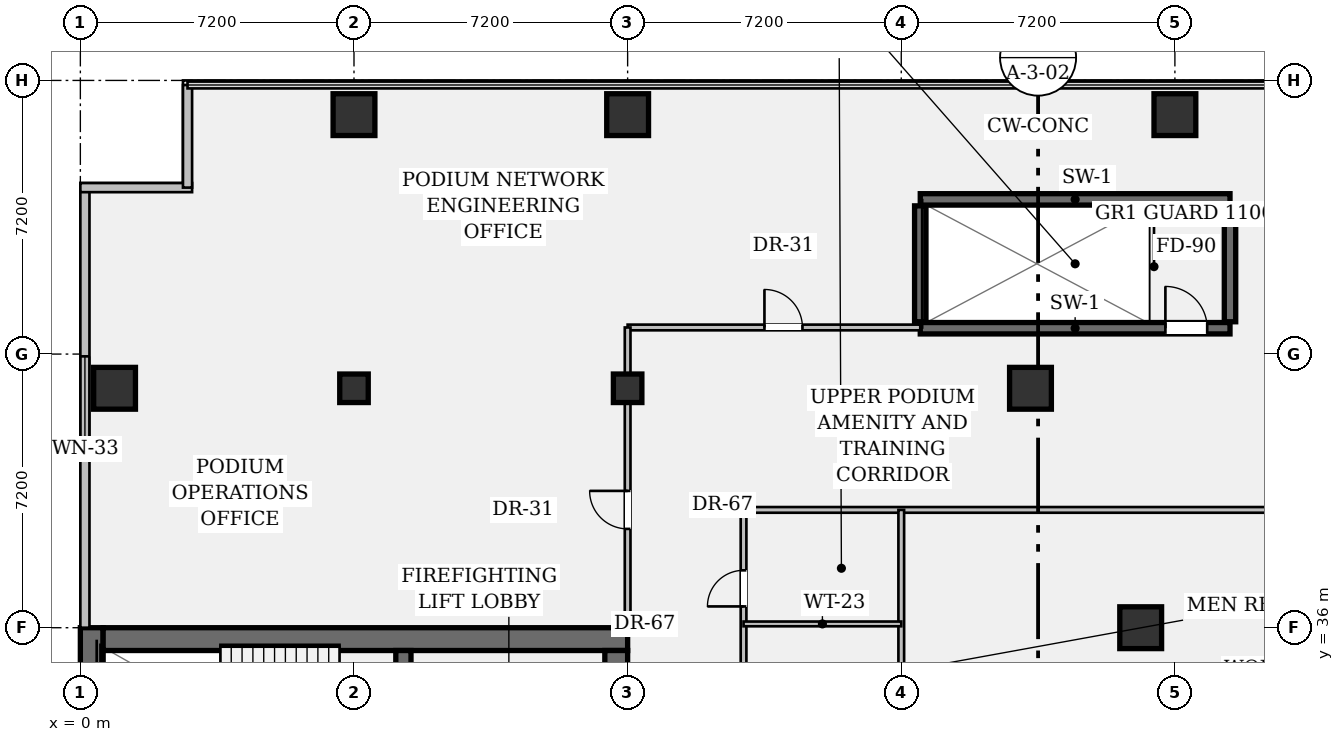
"""IFC4 building model, lengths in metres.
Left out: names, types, materials, properties, quantities, classifications, styles, units other than length and angle.
Written with IfcOpenShell. Run it as: python <this file> out.ifc"""

import sys

from ifc_helpers import new_model, si_unit, direction, frame, frame_2d, origin, origin_2d, place, context, subcontext, project, spatial, rectangle, hollow_rectangle, extrude, element, fill, save


model = new_model("IFC4")
c1 = context("Model", 3, precision=1e-05, world=origin(), true_north=direction((0.0, 1.0)))
c2 = subcontext(c1, "Body", "Model", "MODEL_VIEW")
j1 = project(units=[si_unit("LENGTHUNIT", "METRE"), si_unit("PLANEANGLEUNIT", "RADIAN")], contexts=[c1])
p1 = place(None, origin())
s1 = spatial("IfcSite", under=j1, at=p1, CompositionType="ELEMENT")
p2 = place(p1, origin())
s2 = spatial("IfcBuilding", under=s1, at=p2, CompositionType="ELEMENT")
p3 = place(p2, frame((0.0, 0.0, 22.05)))
s3 = spatial("IfcBuildingStorey", under=s2, at=p3, CompositionType="ELEMENT", Elevation=22.05)
p4 = place(p3, frame((0.3, 7.2, 0.0), z_axis=(0.0, 0.0, 1.0), x_axis=(0.0, 1.0, 0.0)))
e1 = element("IfcWall", 1, at=p4, inside=s3, PredefinedType="SHEAR", context=c2, shape_type="SweptSolid", body=[
    extrude(rectangle(XDim=28.8, YDim=0.6, at=frame_2d((14.4, 0.0))), origin(), (0.0, 0.0, 1.0), 3.9),
])
p5 = place(p3, frame((0.6, 35.7, 0.0), z_axis=(0.0, 0.0, 1.0), x_axis=(1.0, 0.0, 0.0)))
e2 = element("IfcWall", 2, at=p5, inside=s3, PredefinedType="SHEAR", context=c2, shape_type="SweptSolid", body=[
    extrude(rectangle(XDim=13.8, YDim=0.6, at=frame_2d((6.9, 0.0))), origin(), (0.0, 0.0, 1.0), 3.9),
])
p6 = place(p3, frame((14.1, 35.4, 0.0), z_axis=(0.0, 0.0, 1.0), x_axis=(0.0, -1.0, 0.0)))
e3 = element("IfcWall", 3, at=p6, inside=s3, PredefinedType="SHEAR", context=c2, shape_type="SweptSolid", body=[
    extrude(rectangle(XDim=27.6, YDim=0.6, at=frame_2d((13.8, 0.0))), origin(), (0.0, 0.0, 1.0), 3.9),
])
p7 = place(p6, frame((1.3, 0.0, 0.0)))
e4 = element("IfcOpeningElement", 4, at=p7, cuts=e3, PredefinedType="OPENING", context=c2, shape_type="SweptSolid", body=[
    extrude(rectangle(XDim=1.2, YDim=2.15, at=frame_2d((0.6, 1.075))), frame((0.0, 0.312, 0.0), z_axis=(0.0, -1.0, 0.0), x_axis=(1.0, 0.0, 0.0)), (0.0, 0.0, 1.0), 0.624),
])
p8 = place(p6, frame((25.25, 0.0, 0.0)))
e5 = element("IfcOpeningElement", 5, at=p8, cuts=e3, PredefinedType="OPENING", context=c2, shape_type="SweptSolid", body=[
    extrude(rectangle(XDim=1.2, YDim=2.15, at=frame_2d((0.6, 1.075))), frame((0.0, 0.312, 0.0), z_axis=(0.0, -1.0, 0.0), x_axis=(1.0, 0.0, 0.0)), (0.0, 0.0, 1.0), 0.624),
])
p9 = place(p6, frame((14.6, 0.0, 0.0)))
e6 = element("IfcOpeningElement", 6, at=p9, cuts=e3, PredefinedType="OPENING", context=c2, shape_type="SweptSolid", body=[
    extrude(rectangle(XDim=1.6, YDim=2.2, at=frame_2d((0.8, 1.1))), frame((0.0, 0.312, 0.0), z_axis=(0.0, -1.0, 0.0), x_axis=(1.0, 0.0, 0.0)), (0.0, 0.0, 1.0), 0.624),
])
p10 = place(p3, frame((8.5, 31.72, 0.0), z_axis=(0.0, 0.0, 1.0), x_axis=(0.0, 1.0, 0.0)))
e7 = element("IfcWall", 7, at=p10, inside=s3, PredefinedType="SHEAR", context=c2, shape_type="SweptSolid", body=[
    extrude(rectangle(XDim=3.68, YDim=0.4, at=frame_2d((1.84, 0.0))), origin(), (0.0, 0.0, 1.0), 3.9),
])
p11 = place(p10, frame((0.9, 0.0, 0.0)))
e8 = element("IfcOpeningElement", 8, at=p11, cuts=e7, PredefinedType="OPENING", context=c2, shape_type="SweptSolid", body=[
    extrude(rectangle(XDim=1.1, YDim=2.15, at=frame_2d((0.55, 1.075))), frame((0.0, 0.212, 0.0), z_axis=(0.0, -1.0, 0.0), x_axis=(1.0, 0.0, 0.0)), (0.0, 0.0, 1.0), 0.424),
])
p12 = place(p3, frame((22.1, 43.88, 0.0), z_axis=(0.0, 0.0, 1.0), x_axis=(1.0, 0.0, 0.0)))
e9 = element("IfcWall", 9, at=p12, inside=s3, PredefinedType="SHEAR", context=c2, shape_type="SweptSolid", body=[
    extrude(rectangle(XDim=8.15, YDim=0.3, at=frame_2d((4.075, 0.0))), origin(), (0.0, 0.0, 1.0), 3.9),
])
p13 = place(p12, frame((6.45, 0.0, 0.0)))
e10 = element("IfcOpeningElement", 10, at=p13, cuts=e9, PredefinedType="OPENING", context=c2, shape_type="SweptSolid", body=[
    extrude(rectangle(XDim=1.1, YDim=2.15, at=frame_2d((0.55, 1.075))), frame((0.0, 0.162, 0.0), z_axis=(0.0, -1.0, 0.0), x_axis=(1.0, 0.0, 0.0)), (0.0, 0.0, 1.0), 0.324),
])
p14 = place(p3, frame((22.1, 47.27, 0.0), z_axis=(0.0, 0.0, 1.0), x_axis=(1.0, 0.0, 0.0)))
e11 = element("IfcWall", 11, at=p14, inside=s3, PredefinedType="SHEAR", context=c2, shape_type="SweptSolid", body=[
    extrude(rectangle(XDim=8.15, YDim=0.3, at=frame_2d((4.075, 0.0))), origin(), (0.0, 0.0, 1.0), 3.9),
])
for number, where, z_axis, x_axis in (
    (12, (22.1, 44.05, 0.0), (0.0, 0.0, 1.0), (0.0, 1.0, 0.0)),
    (13, (30.25, 44.05, 0.0), (0.0, 0.0, 1.0), (0.0, 1.0, 0.0)),
):
    element("IfcWall", number, at=place(p3, frame(where, z_axis=z_axis, x_axis=x_axis)), inside=s3, PredefinedType="SHEAR", context=c2, shape_type="SweptSolid", body=[
        extrude(rectangle(XDim=3.05, YDim=0.3, at=frame_2d((1.525, 0.0))), origin(), (0.0, 0.0, 1.0), 3.9),
    ])
p15 = place(p3, frame((0.9, 42.3, 0.0), z_axis=(0.0, 0.0, 1.0), x_axis=(1.0, 0.0, 0.0)))
e14 = element("IfcColumn", 14, at=p15, inside=s3, PredefinedType="COLUMN", context=c2, shape_type="SweptSolid", body=[
    extrude(hollow_rectangle(XDim=1.1, YDim=1.1, WallThickness=0.07, at=origin_2d()), origin(), (0.0, 0.0, 1.0), 3.9),
])
p16 = place(p3, frame((7.2, 42.3, 0.0), z_axis=(0.0, 0.0, 1.0), x_axis=(1.0, 0.0, 0.0)))
e15 = element("IfcColumn", 15, at=p16, inside=s3, PredefinedType="COLUMN", context=c2, shape_type="SweptSolid", body=[
    extrude(rectangle(XDim=0.75, YDim=0.75, at=origin_2d()), origin(), (0.0, 0.0, 1.0), 3.9),
])
p17 = place(p3, frame((7.2, 49.5, 0.0), z_axis=(0.0, 0.0, 1.0), x_axis=(1.0, 0.0, 0.0)))
e16 = element("IfcColumn", 16, at=p17, inside=s3, PredefinedType="COLUMN", context=c2, shape_type="SweptSolid", body=[
    extrude(hollow_rectangle(XDim=1.1, YDim=1.1, WallThickness=0.07, at=origin_2d()), origin(), (0.0, 0.0, 1.0), 3.9),
])
p18 = place(p3, frame((14.4, 42.3, 0.0), z_axis=(0.0, 0.0, 1.0), x_axis=(1.0, 0.0, 0.0)))
e17 = element("IfcColumn", 17, at=p18, inside=s3, PredefinedType="COLUMN", context=c2, shape_type="SweptSolid", body=[
    extrude(rectangle(XDim=0.75, YDim=0.75, at=origin_2d()), origin(), (0.0, 0.0, 1.0), 3.9),
])
for number, where, z_axis, x_axis in (
    (18, (14.4, 49.5, 0.0), (0.0, 0.0, 1.0), (1.0, 0.0, 0.0)),
    (19, (25.0, 42.3, 0.0), (0.0, 0.0, 1.0), (1.0, 0.0, 0.0)),
    (20, (27.9, 36.0, 0.0), (0.0, 0.0, 1.0), (1.0, 0.0, 0.0)),
    (21, (28.8, 49.5, 0.0), (0.0, 0.0, 1.0), (1.0, 0.0, 0.0)),
):
    element("IfcColumn", number, at=place(p3, frame(where, z_axis=z_axis, x_axis=x_axis)), inside=s3, PredefinedType="COLUMN", context=c2, shape_type="SweptSolid", body=[
        extrude(hollow_rectangle(XDim=1.1, YDim=1.1, WallThickness=0.07, at=origin_2d()), origin(), (0.0, 0.0, 1.0), 3.9),
    ])
p19 = place(p3, frame((0.12, 36.0, 0.0), z_axis=(0.0, 0.0, 1.0), x_axis=(0.0, 1.0, 0.0)))
e22 = element("IfcWall", 22, at=p19, inside=s3, PredefinedType="STANDARD", context=c2, shape_type="SweptSolid", body=[
    extrude(rectangle(XDim=11.58, YDim=0.24, at=frame_2d((5.79, 0.0))), origin(), (0.0, 0.0, 1.0), 3.9),
])
p20 = place(p19, frame((4.44, 0.0, 0.95)))
e23 = element("IfcOpeningElement", 23, at=p20, cuts=e22, PredefinedType="OPENING", context=c2, shape_type="SweptSolid", body=[
    extrude(rectangle(XDim=2.7, YDim=1.65, at=frame_2d((1.35, 0.825))), frame((0.0, 0.132, 0.0), z_axis=(0.0, -1.0, 0.0), x_axis=(1.0, 0.0, 0.0)), (0.0, 0.0, 1.0), 0.264),
])
p21 = place(p3, frame((0.0, 47.58, 0.0), z_axis=(0.0, 0.0, 1.0), x_axis=(1.0, 0.0, 0.0)))
e24 = element("IfcWall", 24, at=p21, inside=s3, PredefinedType="STANDARD", context=c2, shape_type="SweptSolid", body=[
    extrude(rectangle(XDim=2.94, YDim=0.24, at=frame_2d((1.47, 0.0))), origin(), (0.0, 0.0, 1.0), 3.9),
])
p22 = place(p3, frame((2.82, 47.58, 0.0), z_axis=(0.0, 0.0, 1.0), x_axis=(0.0, 1.0, 0.0)))
e25 = element("IfcWall", 25, at=p22, inside=s3, PredefinedType="STANDARD", context=c2, shape_type="SweptSolid", body=[
    extrude(rectangle(XDim=2.7, YDim=0.24, at=frame_2d((1.35, 0.0))), origin(), (0.0, 0.0, 1.0), 3.9),
])
p23 = place(p3, frame((17.45, 26.8, 0.0), z_axis=(0.0, 0.0, 1.0), x_axis=(0.0, 1.0, 0.0)))
e26 = element("IfcWall", 26, at=p23, inside=s3, PredefinedType="PARTITIONING", context=c2, shape_type="SweptSolid", body=[
    extrude(rectangle(XDim=12.3, YDim=0.15, at=frame_2d((6.15, 0.0))), origin(), (0.0, 0.0, 1.0), 2.958),
])
p24 = place(p23, frame((9.76, 0.0, 0.0)))
e27 = element("IfcOpeningElement", 27, at=p24, cuts=e26, PredefinedType="OPENING", context=c2, shape_type="SweptSolid", body=[
    extrude(rectangle(XDim=0.95, YDim=2.15, at=frame_2d((0.475, 1.075))), frame((0.0, 0.087, 0.0), z_axis=(0.0, -1.0, 0.0), x_axis=(1.0, 0.0, 0.0)), (0.0, 0.0, 1.0), 0.174),
])
p25 = place(p23, frame((6.76, 0.0, 0.0)))
e28 = element("IfcOpeningElement", 28, at=p25, cuts=e26, PredefinedType="OPENING", context=c2, shape_type="SweptSolid", body=[
    extrude(rectangle(XDim=0.95, YDim=2.15, at=frame_2d((0.475, 1.075))), frame((0.0, 0.087, 0.0), z_axis=(0.0, -1.0, 0.0), x_axis=(1.0, 0.0, 0.0)), (0.0, 0.0, 1.0), 0.174),
])
p26 = place(p23, frame((3.76, 0.0, 0.0)))
e29 = element("IfcOpeningElement", 29, at=p26, cuts=e26, PredefinedType="OPENING", context=c2, shape_type="SweptSolid", body=[
    extrude(rectangle(XDim=0.95, YDim=2.15, at=frame_2d((0.475, 1.075))), frame((0.0, 0.087, 0.0), z_axis=(0.0, -1.0, 0.0), x_axis=(1.0, 0.0, 0.0)), (0.0, 0.0, 1.0), 0.174),
])
p27 = place(p23, frame((0.65, 0.0, 0.0)))
e30 = element("IfcOpeningElement", 30, at=p27, cuts=e26, PredefinedType="OPENING", context=c2, shape_type="SweptSolid", body=[
    extrude(rectangle(XDim=0.95, YDim=2.15, at=frame_2d((0.475, 1.075))), frame((0.0, 0.087, 0.0), z_axis=(0.0, -1.0, 0.0), x_axis=(1.0, 0.0, 0.0)), (0.0, 0.0, 1.0), 0.174),
])
p28 = place(p3, frame((14.4, 43.9, 0.0), z_axis=(0.0, 0.0, 1.0), x_axis=(1.0, 0.0, 0.0)))
e31 = element("IfcWall", 31, at=p28, inside=s3, PredefinedType="PARTITIONING", context=c2, shape_type="SweptSolid", body=[
    extrude(rectangle(XDim=7.7, YDim=0.15, at=frame_2d((3.85, 0.0))), origin(), (0.0, 0.0, 1.0), 2.958),
])
p29 = place(p28, frame((3.6, 0.0, 0.0)))
e32 = element("IfcOpeningElement", 32, at=p29, cuts=e31, PredefinedType="OPENING", context=c2, shape_type="SweptSolid", body=[
    extrude(rectangle(XDim=1.0, YDim=2.15, at=frame_2d((0.5, 1.075))), frame((0.0, 0.087, 0.0), z_axis=(0.0, -1.0, 0.0), x_axis=(1.0, 0.0, 0.0)), (0.0, 0.0, 1.0), 0.174),
])
p30 = place(p3, frame((17.45, 39.1, 0.0), z_axis=(0.0, 0.0, 1.0), x_axis=(1.0, 0.0, 0.0)))
e33 = element("IfcWall", 33, at=p30, inside=s3, PredefinedType="PARTITIONING", context=c2, shape_type="SweptSolid", body=[
    extrude(rectangle(XDim=32.83, YDim=0.15, at=frame_2d((16.415, 0.0))), origin(), (0.0, 0.0, 1.0), 2.958),
])
p31 = place(p3, frame((21.6, 26.8, 0.0), z_axis=(0.0, 0.0, 1.0), x_axis=(0.0, 1.0, 0.0)))
e34 = element("IfcWall", 34, at=p31, inside=s3, PredefinedType="PARTITIONING", context=c2, shape_type="SweptSolid", body=[
    extrude(rectangle(XDim=12.3, YDim=0.15, at=frame_2d((6.15, 0.0))), origin(), (0.0, 0.0, 1.0), 2.958),
])
p32 = place(p3, frame((17.45, 36.1, 0.0), z_axis=(0.0, 0.0, 1.0), x_axis=(1.0, 0.0, 0.0)))
e35 = element("IfcWall", 35, at=p32, inside=s3, PredefinedType="PARTITIONING", context=c2, shape_type="SweptSolid", body=[
    extrude(rectangle(XDim=4.15, YDim=0.125, at=frame_2d((2.075, 0.0))), origin(), (0.0, 0.0, 1.0), 2.958),
])
p33 = place(p3, frame((14.4, 36.0, 0.0), z_axis=(0.0, 0.0, 1.0), x_axis=(0.0, 1.0, 0.0)))
e36 = element("IfcWall", 36, at=p33, inside=s3, PredefinedType="PARTITIONING", context=c2, shape_type="SweptSolid", body=[
    extrude(rectangle(XDim=7.9, YDim=0.15, at=frame_2d((3.95, 0.0))), origin(), (0.0, 0.0, 1.0), 2.958),
])
p34 = place(p33, frame((2.6, 0.0, 0.0)))
e37 = element("IfcOpeningElement", 37, at=p34, cuts=e36, PredefinedType="OPENING", context=c2, shape_type="SweptSolid", body=[
    extrude(rectangle(XDim=1.0, YDim=2.15, at=frame_2d((0.5, 1.075))), frame((0.0, 0.087, 0.0), z_axis=(0.0, -1.0, 0.0), x_axis=(1.0, 0.0, 0.0)), (0.0, 0.0, 1.0), 0.174),
])
p35 = place(p20, origin())
e38 = element("IfcWindow", 38, at=p35, inside=s3, PartitioningType="SINGLE_PANEL", PredefinedType="WINDOW", context=c2, shape_type="SweptSolid", body=[
    extrude(rectangle(XDim=2.7, YDim=1.65, at=frame_2d((1.35, 0.825))), frame((0.0, 0.03, 0.0), z_axis=(0.0, -1.0, 0.0), x_axis=(1.0, 0.0, 0.0)), (0.0, 0.0, 1.0), 0.06),
])
fill(e23, e38)
p36 = place(p13, origin())
e39 = element("IfcDoor", 39, at=p36, inside=s3, OperationType="SINGLE_SWING_LEFT", PredefinedType="DOOR", context=c2, shape_type="SweptSolid", body=[
    extrude(rectangle(XDim=1.1, YDim=2.15, at=frame_2d((0.55, 1.075))), frame((0.0, 0.025, 0.0), z_axis=(0.0, -1.0, 0.0), x_axis=(1.0, 0.0, 0.0)), (0.0, 0.0, 1.0), 0.05),
])
fill(e10, e39)
p37 = place(p24, origin())
e40 = element("IfcDoor", 40, at=p37, inside=s3, OperationType="SINGLE_SWING_LEFT", PredefinedType="DOOR", context=c2, shape_type="SweptSolid", body=[
    extrude(rectangle(XDim=0.95, YDim=2.15, at=frame_2d((0.475, 1.075))), frame((0.0, 0.025, 0.0), z_axis=(0.0, -1.0, 0.0), x_axis=(1.0, 0.0, 0.0)), (0.0, 0.0, 1.0), 0.05),
])
fill(e27, e40)
p38 = place(p29, origin())
e41 = element("IfcDoor", 41, at=p38, inside=s3, OperationType="SINGLE_SWING_LEFT", PredefinedType="DOOR", context=c2, shape_type="SweptSolid", body=[
    extrude(rectangle(XDim=1.0, YDim=2.15, at=frame_2d((0.5, 1.075))), frame((0.0, 0.025, 0.0), z_axis=(0.0, -1.0, 0.0), x_axis=(1.0, 0.0, 0.0)), (0.0, 0.0, 1.0), 0.05),
])
fill(e32, e41)
p39 = place(p34, origin())
e42 = element("IfcDoor", 42, at=p39, inside=s3, OperationType="SINGLE_SWING_RIGHT", PredefinedType="DOOR", context=c2, shape_type="SweptSolid", body=[
    extrude(rectangle(XDim=1.0, YDim=2.15, at=frame_2d((0.5, 1.075))), frame((0.0, 0.025, 0.0), z_axis=(0.0, -1.0, 0.0), x_axis=(1.0, 0.0, 0.0)), (0.0, 0.0, 1.0), 0.05),
])
fill(e37, e42)
save(model, sys.argv[1])
